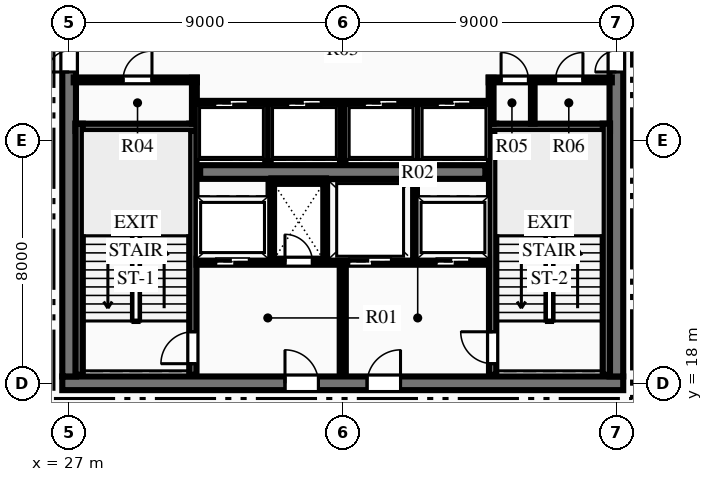
"""IFC4 building model, lengths in metres.
Left out: names, types, materials, properties, quantities, classifications, styles, units other than length and angle.
Written with IfcOpenShell. Run it as: python <this file> out.ifc"""

import sys

from ifc_helpers import new_model, si_unit, direction, frame, frame_2d, origin, place, context, subcontext, project, spatial, rectangle, extrude, element, fill, save


model = new_model("IFC4")
c1 = context("Model", 3, precision=1e-05, world=origin(), true_north=direction((0.0, 1.0)))
c2 = subcontext(c1, "Body", "Model", "MODEL_VIEW")
j1 = project(units=[si_unit("LENGTHUNIT", "METRE"), si_unit("PLANEANGLEUNIT", "RADIAN")], contexts=[c1])
p1 = place(None, origin())
s1 = spatial("IfcSite", under=j1, at=p1, CompositionType="ELEMENT")
p2 = place(p1, origin())
s2 = spatial("IfcBuilding", under=s1, at=p2, CompositionType="ELEMENT")
p3 = place(p2, frame((0.0, 0.0, 336.45)))
s3 = spatial("IfcBuildingStorey", under=s2, at=p3, CompositionType="ELEMENT", Elevation=336.45)
p4 = place(p3, frame((26.775, 18.0, 0.0), z_axis=(0.0, 0.0, 1.0), x_axis=(1.0, 0.0, 0.0)))
e1 = element("IfcWall", 1, at=p4, inside=s3, PredefinedType="SHEAR", context=c2, shape_type="SweptSolid", body=[
    extrude(rectangle(XDim=18.45, YDim=0.45, at=frame_2d((9.225, 0.0))), origin(), (0.0, 0.0, 1.0), 3.75),
])
p5 = place(p4, frame((7.325, 0.0, 0.0)))
e2 = element("IfcOpeningElement", 2, at=p5, cuts=e1, PredefinedType="OPENING", context=c2, shape_type="SweptSolid", body=[
    extrude(rectangle(XDim=1.1, YDim=2.15, at=frame_2d((0.55, 1.075))), frame((0.0, 0.235, 0.0), z_axis=(0.0, -1.0, 0.0), x_axis=(1.0, 0.0, 0.0)), (0.0, 0.0, 1.0), 0.47),
])
p6 = place(p4, frame((10.025, 0.0, 0.0)))
e3 = element("IfcOpeningElement", 3, at=p6, cuts=e1, PredefinedType="OPENING", context=c2, shape_type="SweptSolid", body=[
    extrude(rectangle(XDim=1.1, YDim=2.15, at=frame_2d((0.55, 1.075))), frame((0.0, 0.235, 0.0), z_axis=(0.0, -1.0, 0.0), x_axis=(1.0, 0.0, 0.0)), (0.0, 0.0, 1.0), 0.47),
])
p7 = place(p3, frame((27.0, 18.225, 0.0), z_axis=(0.0, 0.0, 1.0), x_axis=(0.0, 1.0, 0.0)))
e4 = element("IfcWall", 4, at=p7, inside=s3, PredefinedType="SHEAR", context=c2, shape_type="SweptSolid", body=[
    extrude(rectangle(XDim=15.55, YDim=0.45, at=frame_2d((7.775, 0.0))), origin(), (0.0, 0.0, 1.0), 3.75),
])
p8 = place(p7, frame((10.015, 0.0, 0.0)))
e5 = element("IfcOpeningElement", 5, at=p8, cuts=e4, PredefinedType="OPENING", context=c2, shape_type="SweptSolid", body=[
    extrude(rectangle(XDim=1.4, YDim=2.2, at=frame_2d((0.7, 1.1))), frame((0.0, 0.235, 0.0), z_axis=(0.0, -1.0, 0.0), x_axis=(1.0, 0.0, 0.0)), (0.0, 0.0, 1.0), 0.47),
])
p9 = place(p3, frame((45.0, 18.225, 0.0), z_axis=(0.0, 0.0, 1.0), x_axis=(0.0, 1.0, 0.0)))
e6 = element("IfcWall", 6, at=p9, inside=s3, PredefinedType="SHEAR", context=c2, shape_type="SweptSolid", body=[
    extrude(rectangle(XDim=15.55, YDim=0.45, at=frame_2d((7.775, 0.0))), origin(), (0.0, 0.0, 1.0), 3.75),
])
p10 = place(p9, frame((10.015, 0.0, 0.0)))
e7 = element("IfcOpeningElement", 7, at=p10, cuts=e6, PredefinedType="OPENING", context=c2, shape_type="SweptSolid", body=[
    extrude(rectangle(XDim=1.4, YDim=2.2, at=frame_2d((0.7, 1.1))), frame((0.0, 0.235, 0.0), z_axis=(0.0, -1.0, 0.0), x_axis=(1.0, 0.0, 0.0)), (0.0, 0.0, 1.0), 0.47),
])
p11 = place(p3, frame((31.31, 24.95, 0.0), z_axis=(0.0, 0.0, 1.0), x_axis=(1.0, 0.0, 0.0)))
e8 = element("IfcWall", 8, at=p11, inside=s3, PredefinedType="SHEAR", context=c2, shape_type="SweptSolid", body=[
    extrude(rectangle(XDim=9.38, YDim=0.45, at=frame_2d((4.69, 0.0))), origin(), (0.0, 0.0, 1.0), 3.75),
])
p12 = place(p3, frame((31.07, 18.28, 0.0), z_axis=(0.0, 0.0, 1.0), x_axis=(0.0, 1.0, 0.0)))
e9 = element("IfcWall", 9, at=p12, inside=s3, PredefinedType="SHEAR", context=c2, shape_type="SweptSolid", body=[
    extrude(rectangle(XDim=8.26, YDim=0.24, at=frame_2d((4.13, 0.0))), origin(), (0.0, 0.0, 1.0), 3.75),
])
p13 = place(p12, frame((0.365, 0.0, 0.0)))
e10 = element("IfcOpeningElement", 10, at=p13, cuts=e9, PredefinedType="OPENING", context=c2, shape_type="SweptSolid", body=[
    extrude(rectangle(XDim=1.05, YDim=2.15, at=frame_2d((0.525, 1.075))), frame((0.0, 0.13, 0.0), z_axis=(0.0, -1.0, 0.0), x_axis=(1.0, 0.0, 0.0)), (0.0, 0.0, 1.0), 0.26),
])
p14 = place(p3, frame((27.21, 26.42, 0.0), z_axis=(0.0, 0.0, 1.0), x_axis=(1.0, 0.0, 0.0)))
e11 = element("IfcWall", 11, at=p14, inside=s3, PredefinedType="SHEAR", context=c2, shape_type="SweptSolid", body=[
    extrude(rectangle(XDim=3.98, YDim=0.24, at=frame_2d((1.99, 0.0))), origin(), (0.0, 0.0, 1.0), 3.75),
])
p15 = place(p3, frame((27.33, 18.28, 0.0), z_axis=(0.0, 0.0, 1.0), x_axis=(0.0, 1.0, 0.0)))
e12 = element("IfcWall", 12, at=p15, inside=s3, PredefinedType="SHEAR", context=c2, shape_type="SweptSolid", body=[
    extrude(rectangle(XDim=8.26, YDim=0.24, at=frame_2d((4.13, 0.0))), origin(), (0.0, 0.0, 1.0), 3.75),
])
p16 = place(p3, frame((40.93, 18.28, 0.0), z_axis=(0.0, 0.0, 1.0), x_axis=(0.0, 1.0, 0.0)))
e13 = element("IfcWall", 13, at=p16, inside=s3, PredefinedType="SHEAR", context=c2, shape_type="SweptSolid", body=[
    extrude(rectangle(XDim=8.26, YDim=0.24, at=frame_2d((4.13, 0.0))), origin(), (0.0, 0.0, 1.0), 3.75),
])
p17 = place(p16, frame((0.365, 0.0, 0.0)))
e14 = element("IfcOpeningElement", 14, at=p17, cuts=e13, PredefinedType="OPENING", context=c2, shape_type="SweptSolid", body=[
    extrude(rectangle(XDim=1.05, YDim=2.15, at=frame_2d((0.525, 1.075))), frame((0.0, 0.13, 0.0), z_axis=(0.0, -1.0, 0.0), x_axis=(1.0, 0.0, 0.0)), (0.0, 0.0, 1.0), 0.26),
])
p18 = place(p3, frame((40.81, 26.42, 0.0), z_axis=(0.0, 0.0, 1.0), x_axis=(1.0, 0.0, 0.0)))
e15 = element("IfcWall", 15, at=p18, inside=s3, PredefinedType="SHEAR", context=c2, shape_type="SweptSolid", body=[
    extrude(rectangle(XDim=3.98, YDim=0.24, at=frame_2d((1.99, 0.0))), origin(), (0.0, 0.0, 1.0), 3.75),
])
p19 = place(p3, frame((44.67, 18.28, 0.0), z_axis=(0.0, 0.0, 1.0), x_axis=(0.0, 1.0, 0.0)))
e16 = element("IfcWall", 16, at=p19, inside=s3, PredefinedType="SHEAR", context=c2, shape_type="SweptSolid", body=[
    extrude(rectangle(XDim=8.26, YDim=0.24, at=frame_2d((4.13, 0.0))), origin(), (0.0, 0.0, 1.0), 3.75),
])
p20 = place(p3, frame((36.0, 18.28, 0.0), z_axis=(0.0, 0.0, 1.0), x_axis=(0.0, 1.0, 0.0)))
e17 = element("IfcWall", 17, at=p20, inside=s3, PredefinedType="PARTITIONING", context=c2, shape_type="SweptSolid", body=[
    extrude(rectangle(XDim=3.77, YDim=0.2, at=frame_2d((1.885, 0.0))), origin(), (0.0, 0.0, 1.0), 3.49),
])
p21 = place(p3, frame((31.19, 22.0, 0.0), z_axis=(0.0, 0.0, 1.0), x_axis=(1.0, 0.0, 0.0)))
e18 = element("IfcWall", 18, at=p21, inside=s3, PredefinedType="PARTITIONING", context=c2, shape_type="SweptSolid", body=[
    extrude(rectangle(XDim=4.69, YDim=0.2, at=frame_2d((2.345, 0.0))), origin(), (0.0, 0.0, 1.0), 3.49),
])
p22 = place(p21, frame((2.91, 0.0, 0.0)))
e19 = element("IfcOpeningElement", 19, at=p22, cuts=e18, PredefinedType="OPENING", context=c2, shape_type="SweptSolid", body=[
    extrude(rectangle(XDim=0.9, YDim=2.15, at=frame_2d((0.45, 1.075))), frame((0.0, 0.11, 0.0), z_axis=(0.0, -1.0, 0.0), x_axis=(1.0, 0.0, 0.0)), (0.0, 0.0, 1.0), 0.22),
])
p23 = place(p21, frame((0.635, 0.0, 0.0)))
e20 = element("IfcOpeningElement", 20, at=p23, cuts=e18, PredefinedType="OPENING", context=c2, shape_type="SweptSolid", body=[
    extrude(rectangle(XDim=1.1, YDim=2.15, at=frame_2d((0.55, 1.075))), frame((0.0, 0.11, 0.0), z_axis=(0.0, -1.0, 0.0), x_axis=(1.0, 0.0, 0.0)), (0.0, 0.0, 1.0), 0.22),
])
p24 = place(p3, frame((36.12, 22.0, 0.0), z_axis=(0.0, 0.0, 1.0), x_axis=(1.0, 0.0, 0.0)))
e21 = element("IfcWall", 21, at=p24, inside=s3, PredefinedType="PARTITIONING", context=c2, shape_type="SweptSolid", body=[
    extrude(rectangle(XDim=4.69, YDim=0.2, at=frame_2d((2.345, 0.0))), origin(), (0.0, 0.0, 1.0), 3.49),
])
p25 = place(p24, frame((2.955, 0.0, 0.0)))
e22 = element("IfcOpeningElement", 22, at=p25, cuts=e21, PredefinedType="OPENING", context=c2, shape_type="SweptSolid", body=[
    extrude(rectangle(XDim=1.1, YDim=2.15, at=frame_2d((0.55, 1.075))), frame((0.0, 0.11, 0.0), z_axis=(0.0, -1.0, 0.0), x_axis=(1.0, 0.0, 0.0)), (0.0, 0.0, 1.0), 0.22),
])
p26 = place(p24, frame((0.08, 0.0, 0.0)))
e23 = element("IfcOpeningElement", 23, at=p26, cuts=e21, PredefinedType="OPENING", context=c2, shape_type="SweptSolid", body=[
    extrude(rectangle(XDim=1.4, YDim=2.2, at=frame_2d((0.7, 1.1))), frame((0.0, 0.11, 0.0), z_axis=(0.0, -1.0, 0.0), x_axis=(1.0, 0.0, 0.0)), (0.0, 0.0, 1.0), 0.22),
])
for number, where, z_axis, x_axis in (
    (24, (33.65, 22.05, 0.0), (0.0, 0.0, 1.0), (0.0, 1.0, 0.0)),
    (25, (35.45, 22.05, 0.0), (0.0, 0.0, 1.0), (0.0, 1.0, 0.0)),
):
    element("IfcWall", number, at=place(p3, frame(where, z_axis=z_axis, x_axis=x_axis)), inside=s3, PredefinedType="PARTITIONING", context=c2, shape_type="SweptSolid", body=[
        extrude(rectangle(XDim=2.6, YDim=0.18, at=frame_2d((1.3, 0.0))), origin(), (0.0, 0.0, 1.0), 3.49),
    ])
p27 = place(p3, frame((33.65, 24.65, 0.0), z_axis=(0.0, 0.0, 1.0), x_axis=(1.0, 0.0, 0.0)))
e26 = element("IfcWall", 26, at=p27, inside=s3, PredefinedType="PARTITIONING", context=c2, shape_type="SweptSolid", body=[
    extrude(rectangle(XDim=1.8, YDim=0.18, at=frame_2d((0.9, 0.0))), origin(), (0.0, 0.0, 1.0), 3.49),
])
p28 = place(p3, frame((38.35, 22.05, 0.0), z_axis=(0.0, 0.0, 1.0), x_axis=(0.0, 1.0, 0.0)))
e27 = element("IfcWall", 27, at=p28, inside=s3, PredefinedType="PARTITIONING", context=c2, shape_type="SweptSolid", body=[
    extrude(rectangle(XDim=2.6, YDim=0.18, at=frame_2d((1.3, 0.0))), origin(), (0.0, 0.0, 1.0), 3.49),
])
p29 = place(p3, frame((27.15, 27.98, 0.0), z_axis=(0.0, 0.0, 1.0), x_axis=(1.0, 0.0, 0.0)))
e28 = element("IfcWall", 28, at=p29, inside=s3, PredefinedType="PARTITIONING", context=c2, shape_type="SweptSolid", body=[
    extrude(rectangle(XDim=4.05, YDim=0.16, at=frame_2d((2.025, 0.0))), origin(), (0.0, 0.0, 1.0), 3.49),
])
p30 = place(p29, frame((1.625, 0.0, 0.0)))
e29 = element("IfcOpeningElement", 29, at=p30, cuts=e28, PredefinedType="OPENING", context=c2, shape_type="SweptSolid", body=[
    extrude(rectangle(XDim=0.95, YDim=2.15, at=frame_2d((0.475, 1.075))), frame((0.0, 0.09, 0.0), z_axis=(0.0, -1.0, 0.0), x_axis=(1.0, 0.0, 0.0)), (0.0, 0.0, 1.0), 0.18),
])
p31 = place(p3, frame((31.12, 26.54, 0.0), z_axis=(0.0, 0.0, 1.0), x_axis=(0.0, 1.0, 0.0)))
e30 = element("IfcWall", 30, at=p31, inside=s3, PredefinedType="PARTITIONING", context=c2, shape_type="SweptSolid", body=[
    extrude(rectangle(XDim=1.51, YDim=0.16, at=frame_2d((0.755, 0.0))), origin(), (0.0, 0.0, 1.0), 3.49),
])
p32 = place(p3, frame((40.8, 27.98, 0.0), z_axis=(0.0, 0.0, 1.0), x_axis=(1.0, 0.0, 0.0)))
e31 = element("IfcWall", 31, at=p32, inside=s3, PredefinedType="PARTITIONING", context=c2, shape_type="SweptSolid", body=[
    extrude(rectangle(XDim=4.05, YDim=0.16, at=frame_2d((2.025, 0.0))), origin(), (0.0, 0.0, 1.0), 3.49),
])
p33 = place(p32, frame((0.407, 0.0, 0.0)))
e32 = element("IfcOpeningElement", 32, at=p33, cuts=e31, PredefinedType="OPENING", context=c2, shape_type="SweptSolid", body=[
    extrude(rectangle(XDim=0.9, YDim=2.15, at=frame_2d((0.45, 1.075))), frame((0.0, 0.09, 0.0), z_axis=(0.0, -1.0, 0.0), x_axis=(1.0, 0.0, 0.0)), (0.0, 0.0, 1.0), 0.18),
])
p34 = place(p32, frame((2.2, 0.0, 0.0)))
e33 = element("IfcOpeningElement", 33, at=p34, cuts=e31, PredefinedType="OPENING", context=c2, shape_type="SweptSolid", body=[
    extrude(rectangle(XDim=0.9, YDim=2.15, at=frame_2d((0.45, 1.075))), frame((0.0, 0.09, 0.0), z_axis=(0.0, -1.0, 0.0), x_axis=(1.0, 0.0, 0.0)), (0.0, 0.0, 1.0), 0.18),
])
p35 = place(p3, frame((40.88, 26.54, 0.0), z_axis=(0.0, 0.0, 1.0), x_axis=(0.0, 1.0, 0.0)))
e34 = element("IfcWall", 34, at=p35, inside=s3, PredefinedType="PARTITIONING", context=c2, shape_type="SweptSolid", body=[
    extrude(rectangle(XDim=1.51, YDim=0.16, at=frame_2d((0.755, 0.0))), origin(), (0.0, 0.0, 1.0), 3.49),
])
p36 = place(p3, frame((42.25, 26.54, 0.0), z_axis=(0.0, 0.0, 1.0), x_axis=(0.0, 1.0, 0.0)))
e35 = element("IfcWall", 35, at=p36, inside=s3, PredefinedType="PARTITIONING", context=c2, shape_type="SweptSolid", body=[
    extrude(rectangle(XDim=1.44, YDim=0.12, at=frame_2d((0.72, 0.0))), origin(), (0.0, 0.0, 1.0), 3.49),
])
p37 = place(p3, frame((31.2, 27.2, 0.0), z_axis=(0.0, 0.0, 1.0), x_axis=(1.0, 0.0, 0.0)))
e36 = element("IfcWall", 36, at=p37, inside=s3, PredefinedType="PARTITIONING", context=c2, shape_type="SweptSolid", body=[
    extrude(rectangle(XDim=9.6, YDim=0.18, at=frame_2d((4.8, 0.0))), origin(), (0.0, 0.0, 1.0), 3.49),
])
p38 = place(p37, frame((0.59, 0.0, 0.0)))
e37 = element("IfcOpeningElement", 37, at=p38, cuts=e36, PredefinedType="OPENING", context=c2, shape_type="SweptSolid", body=[
    extrude(rectangle(XDim=1.1, YDim=2.15, at=frame_2d((0.55, 1.075))), frame((0.0, 0.1, 0.0), z_axis=(0.0, -1.0, 0.0), x_axis=(1.0, 0.0, 0.0)), (0.0, 0.0, 1.0), 0.2),
])
p39 = place(p37, frame((2.99, 0.0, 0.0)))
e38 = element("IfcOpeningElement", 38, at=p39, cuts=e36, PredefinedType="OPENING", context=c2, shape_type="SweptSolid", body=[
    extrude(rectangle(XDim=1.1, YDim=2.15, at=frame_2d((0.55, 1.075))), frame((0.0, 0.1, 0.0), z_axis=(0.0, -1.0, 0.0), x_axis=(1.0, 0.0, 0.0)), (0.0, 0.0, 1.0), 0.2),
])
p40 = place(p37, frame((5.51, 0.0, 0.0)))
e39 = element("IfcOpeningElement", 39, at=p40, cuts=e36, PredefinedType="OPENING", context=c2, shape_type="SweptSolid", body=[
    extrude(rectangle(XDim=1.1, YDim=2.15, at=frame_2d((0.55, 1.075))), frame((0.0, 0.1, 0.0), z_axis=(0.0, -1.0, 0.0), x_axis=(1.0, 0.0, 0.0)), (0.0, 0.0, 1.0), 0.2),
])
p41 = place(p37, frame((7.91, 0.0, 0.0)))
e40 = element("IfcOpeningElement", 40, at=p41, cuts=e36, PredefinedType="OPENING", context=c2, shape_type="SweptSolid", body=[
    extrude(rectangle(XDim=1.1, YDim=2.15, at=frame_2d((0.55, 1.075))), frame((0.0, 0.1, 0.0), z_axis=(0.0, -1.0, 0.0), x_axis=(1.0, 0.0, 0.0)), (0.0, 0.0, 1.0), 0.2),
])
for number, where, z_axis, x_axis in (
    (41, (33.54, 25.3, 0.0), (0.0, 0.0, 1.0), (0.0, 1.0, 0.0)),
    (42, (36.0, 25.3, 0.0), (0.0, 0.0, 1.0), (0.0, 1.0, 0.0)),
    (43, (38.46, 25.3, 0.0), (0.0, 0.0, 1.0), (0.0, 1.0, 0.0)),
):
    element("IfcWall", number, at=place(p3, frame(where, z_axis=z_axis, x_axis=x_axis)), inside=s3, PredefinedType="PARTITIONING", context=c2, shape_type="SweptSolid", body=[
        extrude(rectangle(XDim=1.9, YDim=0.18, at=frame_2d((0.95, 0.0))), origin(), (0.0, 0.0, 1.0), 3.49),
    ])
p42 = place(p30, origin())
e44 = element("IfcDoor", 44, at=p42, inside=s3, OperationType="SINGLE_SWING_RIGHT", PredefinedType="DOOR", context=c2, shape_type="SweptSolid", body=[
    extrude(rectangle(XDim=0.95, YDim=2.15, at=frame_2d((0.475, 1.075))), frame((0.0, 0.025, 0.0), z_axis=(0.0, -1.0, 0.0), x_axis=(1.0, 0.0, 0.0)), (0.0, 0.0, 1.0), 0.05),
])
fill(e29, e44)
p43 = place(p33, origin())
e45 = element("IfcDoor", 45, at=p43, inside=s3, OperationType="SINGLE_SWING_LEFT", PredefinedType="DOOR", context=c2, shape_type="SweptSolid", body=[
    extrude(rectangle(XDim=0.9, YDim=2.15, at=frame_2d((0.45, 1.075))), frame((0.0, 0.025, 0.0), z_axis=(0.0, -1.0, 0.0), x_axis=(1.0, 0.0, 0.0)), (0.0, 0.0, 1.0), 0.05),
])
fill(e32, e45)
p44 = place(p34, origin())
e46 = element("IfcDoor", 46, at=p44, inside=s3, OperationType="SINGLE_SWING_RIGHT", PredefinedType="DOOR", context=c2, shape_type="SweptSolid", body=[
    extrude(rectangle(XDim=0.9, YDim=2.15, at=frame_2d((0.45, 1.075))), frame((0.0, 0.025, 0.0), z_axis=(0.0, -1.0, 0.0), x_axis=(1.0, 0.0, 0.0)), (0.0, 0.0, 1.0), 0.05),
])
fill(e33, e46)
p45 = place(p13, origin())
e47 = element("IfcDoor", 47, at=p45, inside=s3, OperationType="SINGLE_SWING_LEFT", PredefinedType="DOOR", context=c2, shape_type="SweptSolid", body=[
    extrude(rectangle(XDim=1.05, YDim=2.15, at=frame_2d((0.525, 1.075))), frame((0.0, 0.025, 0.0), z_axis=(0.0, -1.0, 0.0), x_axis=(1.0, 0.0, 0.0)), (0.0, 0.0, 1.0), 0.05),
])
fill(e10, e47)
p46 = place(p17, origin())
e48 = element("IfcDoor", 48, at=p46, inside=s3, OperationType="SINGLE_SWING_RIGHT", PredefinedType="DOOR", context=c2, shape_type="SweptSolid", body=[
    extrude(rectangle(XDim=1.05, YDim=2.15, at=frame_2d((0.525, 1.075))), frame((0.0, 0.025, 0.0), z_axis=(0.0, -1.0, 0.0), x_axis=(1.0, 0.0, 0.0)), (0.0, 0.0, 1.0), 0.05),
])
fill(e14, e48)
p47 = place(p5, origin())
e49 = element("IfcDoor", 49, at=p47, inside=s3, OperationType="SINGLE_SWING_LEFT", PredefinedType="DOOR", context=c2, shape_type="SweptSolid", body=[
    extrude(rectangle(XDim=1.1, YDim=2.15, at=frame_2d((0.55, 1.075))), frame((0.0, 0.025, 0.0), z_axis=(0.0, -1.0, 0.0), x_axis=(1.0, 0.0, 0.0)), (0.0, 0.0, 1.0), 0.05),
])
fill(e2, e49)
p48 = place(p6, origin())
e50 = element("IfcDoor", 50, at=p48, inside=s3, OperationType="SINGLE_SWING_RIGHT", PredefinedType="DOOR", context=c2, shape_type="SweptSolid", body=[
    extrude(rectangle(XDim=1.1, YDim=2.15, at=frame_2d((0.55, 1.075))), frame((0.0, 0.025, 0.0), z_axis=(0.0, -1.0, 0.0), x_axis=(1.0, 0.0, 0.0)), (0.0, 0.0, 1.0), 0.05),
])
fill(e3, e50)
p49 = place(p22, origin())
e51 = element("IfcDoor", 51, at=p49, inside=s3, OperationType="SINGLE_SWING_LEFT", PredefinedType="DOOR", context=c2, shape_type="SweptSolid", body=[
    extrude(rectangle(XDim=0.9, YDim=2.15, at=frame_2d((0.45, 1.075))), frame((0.0, 0.025, 0.0), z_axis=(0.0, -1.0, 0.0), x_axis=(1.0, 0.0, 0.0)), (0.0, 0.0, 1.0), 0.05),
])
fill(e19, e51)
p50 = place(p8, origin())
e52 = element("IfcDoor", 52, at=p50, inside=s3, OperationType="DOUBLE_DOOR_SINGLE_SWING", PredefinedType="DOOR", context=c2, shape_type="SweptSolid", body=[
    extrude(rectangle(XDim=1.4, YDim=2.2, at=frame_2d((0.7, 1.1))), frame((0.0, 0.025, 0.0), z_axis=(0.0, -1.0, 0.0), x_axis=(1.0, 0.0, 0.0)), (0.0, 0.0, 1.0), 0.05),
])
fill(e5, e52)
p51 = place(p10, origin())
e53 = element("IfcDoor", 53, at=p51, inside=s3, OperationType="DOUBLE_DOOR_SINGLE_SWING", PredefinedType="DOOR", context=c2, shape_type="SweptSolid", body=[
    extrude(rectangle(XDim=1.4, YDim=2.2, at=frame_2d((0.7, 1.1))), frame((0.0, 0.025, 0.0), z_axis=(0.0, -1.0, 0.0), x_axis=(1.0, 0.0, 0.0)), (0.0, 0.0, 1.0), 0.05),
])
fill(e7, e53)
p52 = place(p38, origin())
e54 = element("IfcDoor", 54, at=p52, inside=s3, OperationType="SLIDING_TO_LEFT", PredefinedType="DOOR", context=c2, shape_type="SweptSolid", body=[
    extrude(rectangle(XDim=1.1, YDim=2.15, at=frame_2d((0.55, 1.075))), frame((0.0, 0.025, 0.0), z_axis=(0.0, -1.0, 0.0), x_axis=(1.0, 0.0, 0.0)), (0.0, 0.0, 1.0), 0.05),
])
fill(e37, e54)
p53 = place(p39, origin())
e55 = element("IfcDoor", 55, at=p53, inside=s3, OperationType="SLIDING_TO_LEFT", PredefinedType="DOOR", context=c2, shape_type="SweptSolid", body=[
    extrude(rectangle(XDim=1.1, YDim=2.15, at=frame_2d((0.55, 1.075))), frame((0.0, 0.025, 0.0), z_axis=(0.0, -1.0, 0.0), x_axis=(1.0, 0.0, 0.0)), (0.0, 0.0, 1.0), 0.05),
])
fill(e38, e55)
p54 = place(p40, origin())
e56 = element("IfcDoor", 56, at=p54, inside=s3, OperationType="SLIDING_TO_LEFT", PredefinedType="DOOR", context=c2, shape_type="SweptSolid", body=[
    extrude(rectangle(XDim=1.1, YDim=2.15, at=frame_2d((0.55, 1.075))), frame((0.0, 0.025, 0.0), z_axis=(0.0, -1.0, 0.0), x_axis=(1.0, 0.0, 0.0)), (0.0, 0.0, 1.0), 0.05),
])
fill(e39, e56)
p55 = place(p41, origin())
e57 = element("IfcDoor", 57, at=p55, inside=s3, OperationType="SLIDING_TO_LEFT", PredefinedType="DOOR", context=c2, shape_type="SweptSolid", body=[
    extrude(rectangle(XDim=1.1, YDim=2.15, at=frame_2d((0.55, 1.075))), frame((0.0, 0.025, 0.0), z_axis=(0.0, -1.0, 0.0), x_axis=(1.0, 0.0, 0.0)), (0.0, 0.0, 1.0), 0.05),
])
fill(e40, e57)
p56 = place(p23, origin())
e58 = element("IfcDoor", 58, at=p56, inside=s3, OperationType="SLIDING_TO_LEFT", PredefinedType="DOOR", context=c2, shape_type="SweptSolid", body=[
    extrude(rectangle(XDim=1.1, YDim=2.15, at=frame_2d((0.55, 1.075))), frame((0.0, 0.025, 0.0), z_axis=(0.0, -1.0, 0.0), x_axis=(1.0, 0.0, 0.0)), (0.0, 0.0, 1.0), 0.05),
])
fill(e20, e58)
p57 = place(p25, origin())
e59 = element("IfcDoor", 59, at=p57, inside=s3, OperationType="SLIDING_TO_LEFT", PredefinedType="DOOR", context=c2, shape_type="SweptSolid", body=[
    extrude(rectangle(XDim=1.1, YDim=2.15, at=frame_2d((0.55, 1.075))), frame((0.0, 0.025, 0.0), z_axis=(0.0, -1.0, 0.0), x_axis=(1.0, 0.0, 0.0)), (0.0, 0.0, 1.0), 0.05),
])
fill(e22, e59)
p58 = place(p26, origin())
e60 = element("IfcDoor", 60, at=p58, inside=s3, OperationType="SLIDING_TO_LEFT", PredefinedType="DOOR", context=c2, shape_type="SweptSolid", body=[
    extrude(rectangle(XDim=1.4, YDim=2.2, at=frame_2d((0.7, 1.1))), frame((0.0, 0.025, 0.0), z_axis=(0.0, -1.0, 0.0), x_axis=(1.0, 0.0, 0.0)), (0.0, 0.0, 1.0), 0.05),
])
fill(e23, e60)
save(model, sys.argv[1])
